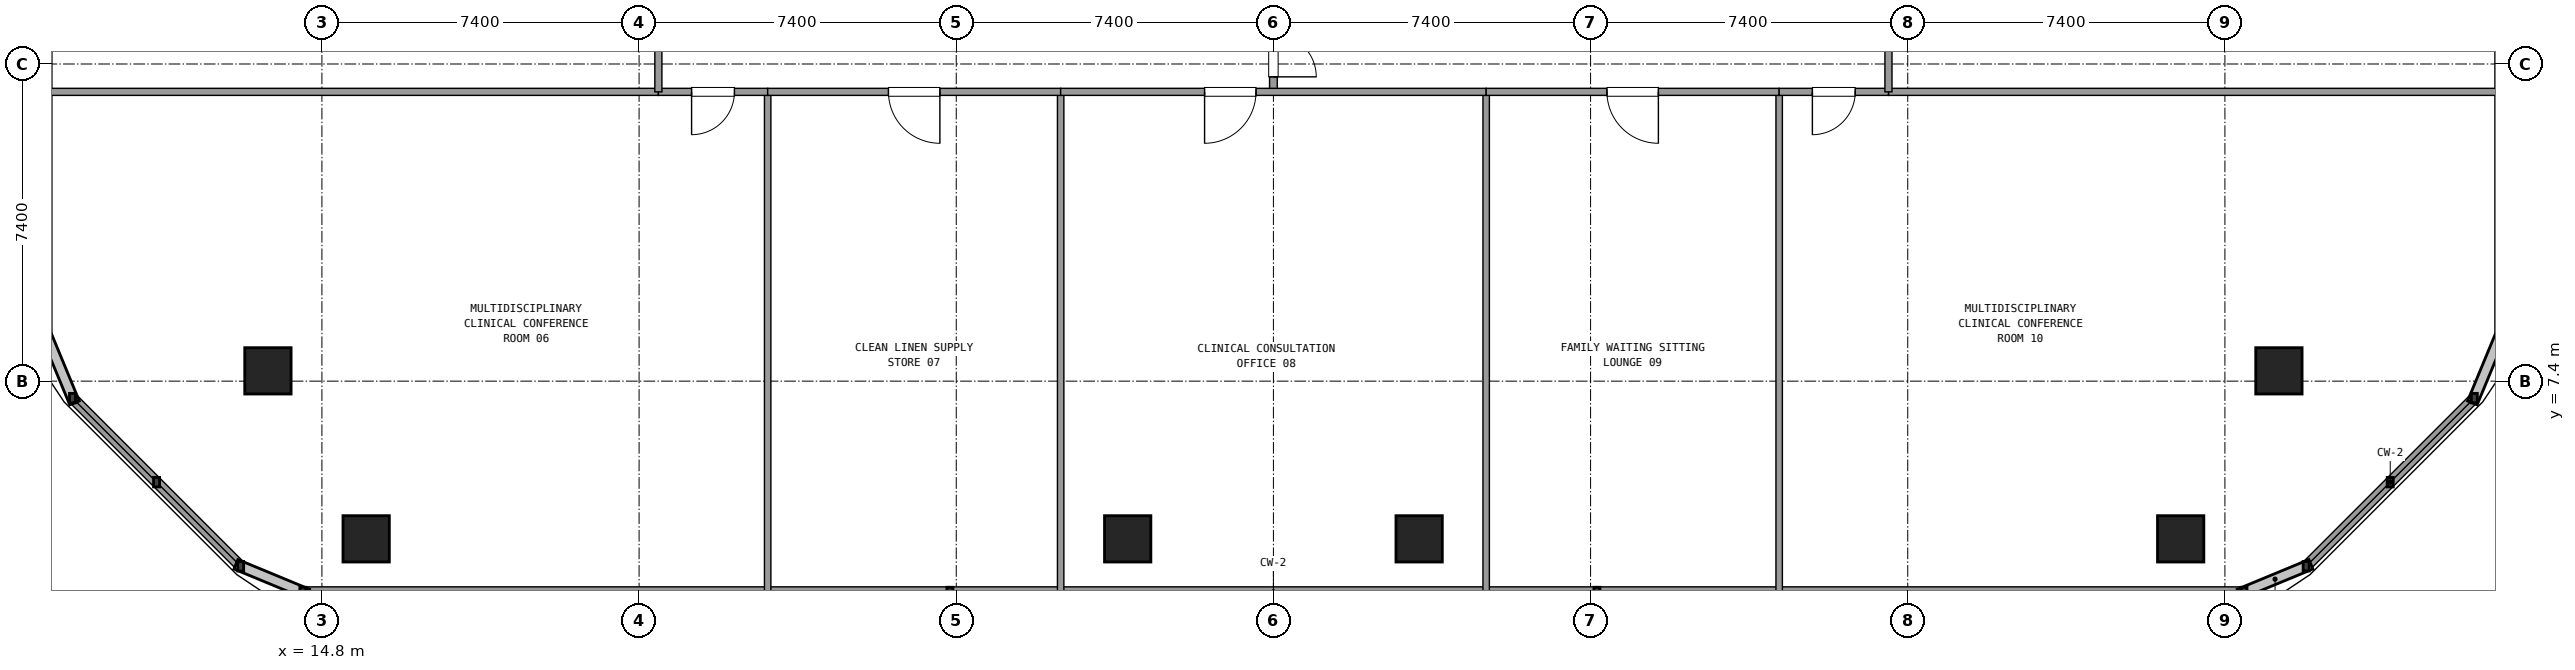
"""IFC4 building model, lengths in metres.
Left out: names, types, materials, properties, quantities, classifications, styles, units other than length and angle.
Written with IfcOpenShell. Run it as: python <this file> out.ifc"""

import sys

from ifc_helpers import new_model, si_unit, direction, frame, frame_2d, origin, origin_2d, place, context, subcontext, project, spatial, rectangle, extrude, element, fill, save


model = new_model("IFC4")
c1 = context("Model", 3, precision=1e-05, world=origin(), true_north=direction((0.0, 1.0)))
c2 = subcontext(c1, "Body", "Model", "MODEL_VIEW")
j1 = project(units=[si_unit("LENGTHUNIT", "METRE"), si_unit("PLANEANGLEUNIT", "RADIAN")], contexts=[c1])
p1 = place(None, origin())
s1 = spatial("IfcSite", under=j1, at=p1, CompositionType="ELEMENT")
p2 = place(p1, origin())
s2 = spatial("IfcBuilding", under=s1, at=p2, CompositionType="ELEMENT")
p3 = place(p2, frame((0.0, 0.0, 41.94)))
s3 = spatial("IfcBuildingStorey", under=s2, at=p3, CompositionType="ELEMENT", Elevation=41.94)
for number, where, z_axis, x_axis in (
    (1, (13.54, 7.64, 0.0), (0.0, 0.0, 1.0), (1.0, 0.0, 0.0)),
    (2, (15.832, 3.72, 0.0), (0.0, 0.0, 1.0), (1.0, 0.0, 0.0)),
    (3, (33.6, 3.72, 0.0), (0.0, 0.0, 1.0), (1.0, 0.0, 0.0)),
    (4, (40.4, 3.72, 0.0), (0.0, 0.0, 1.0), (1.0, 0.0, 0.0)),
    (5, (58.168, 3.72, 0.0), (0.0, 0.0, 1.0), (1.0, 0.0, 0.0)),
    (6, (60.46, 7.64, 0.0), (0.0, 0.0, 1.0), (1.0, 0.0, 0.0)),
):
    element("IfcColumn", number, at=place(p3, frame(where, z_axis=z_axis, x_axis=x_axis)), inside=s3, PredefinedType="COLUMN", context=c2, shape_type="SweptSolid", body=[
        extrude(rectangle(XDim=1.08, YDim=1.08, at=origin_2d()), origin(), (0.0, 0.0, 1.0), 3.6),
    ])
p4 = place(p3, frame((14.355, 2.48, 0.0), z_axis=(0.0, 0.0, 1.0), x_axis=(1.0, 0.0, 0.0)))
e7 = element("IfcWall", 7, at=p4, inside=s3, PredefinedType="SOLIDWALL", context=c2, shape_type="SweptSolid", body=[
    extrude(rectangle(XDim=45.29, YDim=0.24, at=frame_2d((22.645, 0.0))), origin(), (0.0, 0.0, 1.0), 0.85),
])
for number, where, z_axis, x_axis in (
    (8, (61.096, 3.081, 0.0), (0.0, 0.0, 1.0), (0.707, 0.707, 0.0)),
    (9, (8.981, 7.004, 0.0), (0.0, 0.0, 1.0), (0.707, -0.707, 0.0)),
):
    element("IfcWall", number, at=place(p3, frame(where, z_axis=z_axis, x_axis=x_axis)), inside=s3, PredefinedType="SOLIDWALL", context=c2, shape_type="SweptSolid", body=[
        extrude(rectangle(XDim=5.548, YDim=0.24, at=frame_2d((2.774, 0.0))), origin(), (0.0, 0.0, 1.0), 0.85),
    ])
p5 = place(p3, frame((37.0, 14.15, 0.0), z_axis=(0.0, 0.0, 1.0), x_axis=(0.0, 1.0, 0.0)))
e10 = element("IfcWall", 10, at=p5, inside=s3, PredefinedType="PARTITIONING", context=c2, shape_type="SweptSolid", body=[
    extrude(rectangle(XDim=2.7, YDim=0.18, at=frame_2d((1.35, 0.0))), origin(), (0.0, 0.0, 1.0), 2.61),
])
p6 = place(p5, frame((0.35, 0.0, 0.0)))
e11 = element("IfcOpeningElement", 11, at=p6, cuts=e10, PredefinedType="OPENING", context=c2, shape_type="SweptSolid", body=[
    extrude(rectangle(XDim=2.0, YDim=2.2, at=frame_2d((1.0, 1.1))), frame((0.0, 0.1, 0.0), z_axis=(0.0, -1.0, 0.0), x_axis=(1.0, 0.0, 0.0)), (0.0, 0.0, 1.0), 0.2),
])
for number, where, z_axis, x_axis in (
    (12, (8.4, 14.15, 0.0), (0.0, 0.0, 1.0), (1.0, 0.0, 0.0)),
    (13, (51.35, 14.15, 0.0), (0.0, 0.0, 1.0), (1.0, 0.0, 0.0)),
):
    element("IfcWall", number, at=place(p3, frame(where, z_axis=z_axis, x_axis=x_axis)), inside=s3, PredefinedType="PARTITIONING", context=c2, shape_type="SweptSolid", body=[
        extrude(rectangle(XDim=14.25, YDim=0.165, at=frame_2d((7.125, 0.0))), origin(), (0.0, 0.0, 1.0), 2.61),
    ])
p7 = place(p3, frame((25.2, 14.15, 0.0), z_axis=(0.0, 0.0, 1.0), x_axis=(0.0, -1.0, 0.0)))
e14 = element("IfcWall", 14, at=p7, inside=s3, PredefinedType="PARTITIONING", context=c2, shape_type="SweptSolid", body=[
    extrude(rectangle(XDim=11.65, YDim=0.15, at=frame_2d((5.825, 0.0))), origin(), (0.0, 0.0, 1.0), 2.61),
])
p8 = place(p3, frame((22.65, 14.15, 0.0), z_axis=(0.0, 0.0, 1.0), x_axis=(1.0, 0.0, 0.0)))
e15 = element("IfcWall", 15, at=p8, inside=s3, PredefinedType="PARTITIONING", context=c2, shape_type="SweptSolid", body=[
    extrude(rectangle(XDim=2.55, YDim=0.165, at=frame_2d((1.275, 0.0))), origin(), (0.0, 0.0, 1.0), 2.61),
])
p9 = place(p8, frame((0.775, 0.0, 0.0)))
e16 = element("IfcOpeningElement", 16, at=p9, cuts=e15, PredefinedType="OPENING", context=c2, shape_type="SweptSolid", body=[
    extrude(rectangle(XDim=1.0, YDim=2.15, at=frame_2d((0.5, 1.075))), frame((0.0, 0.093, 0.0), z_axis=(0.0, -1.0, 0.0), x_axis=(1.0, 0.0, 0.0)), (0.0, 0.0, 1.0), 0.185),
])
p10 = place(p3, frame((32.036, 14.15, 0.0), z_axis=(0.0, 0.0, 1.0), x_axis=(0.0, -1.0, 0.0)))
e17 = element("IfcWall", 17, at=p10, inside=s3, PredefinedType="PARTITIONING", context=c2, shape_type="SweptSolid", body=[
    extrude(rectangle(XDim=11.65, YDim=0.15, at=frame_2d((5.825, 0.0))), origin(), (0.0, 0.0, 1.0), 2.61),
])
p11 = place(p3, frame((25.2, 14.15, 0.0), z_axis=(0.0, 0.0, 1.0), x_axis=(1.0, 0.0, 0.0)))
e18 = element("IfcWall", 18, at=p11, inside=s3, PredefinedType="PARTITIONING", context=c2, shape_type="SweptSolid", body=[
    extrude(rectangle(XDim=6.836, YDim=0.165, at=frame_2d((3.418, 0.0))), origin(), (0.0, 0.0, 1.0), 2.61),
])
p12 = place(p11, frame((2.818, 0.0, 0.0)))
e19 = element("IfcOpeningElement", 19, at=p12, cuts=e18, PredefinedType="OPENING", context=c2, shape_type="SweptSolid", body=[
    extrude(rectangle(XDim=1.2, YDim=2.15, at=frame_2d((0.6, 1.075))), frame((0.0, 0.093, 0.0), z_axis=(0.0, -1.0, 0.0), x_axis=(1.0, 0.0, 0.0)), (0.0, 0.0, 1.0), 0.185),
])
p13 = place(p3, frame((41.964, 14.15, 0.0), z_axis=(0.0, 0.0, 1.0), x_axis=(0.0, -1.0, 0.0)))
e20 = element("IfcWall", 20, at=p13, inside=s3, PredefinedType="PARTITIONING", context=c2, shape_type="SweptSolid", body=[
    extrude(rectangle(XDim=11.65, YDim=0.15, at=frame_2d((5.825, 0.0))), origin(), (0.0, 0.0, 1.0), 2.61),
])
p14 = place(p3, frame((32.036, 14.15, 0.0), z_axis=(0.0, 0.0, 1.0), x_axis=(1.0, 0.0, 0.0)))
e21 = element("IfcWall", 21, at=p14, inside=s3, PredefinedType="PARTITIONING", context=c2, shape_type="SweptSolid", body=[
    extrude(rectangle(XDim=9.928, YDim=0.165, at=frame_2d((4.964, 0.0))), origin(), (0.0, 0.0, 1.0), 2.61),
])
p15 = place(p14, frame((3.358, 0.0, 0.0)))
e22 = element("IfcOpeningElement", 22, at=p15, cuts=e21, PredefinedType="OPENING", context=c2, shape_type="SweptSolid", body=[
    extrude(rectangle(XDim=1.2, YDim=2.15, at=frame_2d((0.6, 1.075))), frame((0.0, 0.093, 0.0), z_axis=(0.0, -1.0, 0.0), x_axis=(1.0, 0.0, 0.0)), (0.0, 0.0, 1.0), 0.185),
])
p16 = place(p3, frame((48.8, 14.15, 0.0), z_axis=(0.0, 0.0, 1.0), x_axis=(0.0, -1.0, 0.0)))
e23 = element("IfcWall", 23, at=p16, inside=s3, PredefinedType="PARTITIONING", context=c2, shape_type="SweptSolid", body=[
    extrude(rectangle(XDim=11.65, YDim=0.15, at=frame_2d((5.825, 0.0))), origin(), (0.0, 0.0, 1.0), 2.61),
])
p17 = place(p3, frame((41.964, 14.15, 0.0), z_axis=(0.0, 0.0, 1.0), x_axis=(1.0, 0.0, 0.0)))
e24 = element("IfcWall", 24, at=p17, inside=s3, PredefinedType="PARTITIONING", context=c2, shape_type="SweptSolid", body=[
    extrude(rectangle(XDim=6.836, YDim=0.165, at=frame_2d((3.418, 0.0))), origin(), (0.0, 0.0, 1.0), 2.61),
])
p18 = place(p17, frame((2.818, 0.0, 0.0)))
e25 = element("IfcOpeningElement", 25, at=p18, cuts=e24, PredefinedType="OPENING", context=c2, shape_type="SweptSolid", body=[
    extrude(rectangle(XDim=1.2, YDim=2.15, at=frame_2d((0.6, 1.075))), frame((0.0, 0.093, 0.0), z_axis=(0.0, -1.0, 0.0), x_axis=(1.0, 0.0, 0.0)), (0.0, 0.0, 1.0), 0.185),
])
p19 = place(p3, frame((48.8, 14.15, 0.0), z_axis=(0.0, 0.0, 1.0), x_axis=(1.0, 0.0, 0.0)))
e26 = element("IfcWall", 26, at=p19, inside=s3, PredefinedType="PARTITIONING", context=c2, shape_type="SweptSolid", body=[
    extrude(rectangle(XDim=2.55, YDim=0.165, at=frame_2d((1.275, 0.0))), origin(), (0.0, 0.0, 1.0), 2.61),
])
p20 = place(p19, frame((0.775, 0.0, 0.0)))
e27 = element("IfcOpeningElement", 27, at=p20, cuts=e26, PredefinedType="OPENING", context=c2, shape_type="SweptSolid", body=[
    extrude(rectangle(XDim=1.0, YDim=2.15, at=frame_2d((0.5, 1.075))), frame((0.0, 0.093, 0.0), z_axis=(0.0, -1.0, 0.0), x_axis=(1.0, 0.0, 0.0)), (0.0, 0.0, 1.0), 0.185),
])
p21 = place(p3, frame((22.65, 14.15, 0.0), z_axis=(0.0, 0.0, 1.0), x_axis=(0.0, 1.0, 0.0)))
e28 = element("IfcWall", 28, at=p21, inside=s3, PredefinedType="PARTITIONING", context=c2, shape_type="SweptSolid", body=[
    extrude(rectangle(XDim=5.377, YDim=0.165, at=frame_2d((2.688, 0.0))), origin(), (0.0, 0.0, 1.0), 2.61),
])
p22 = place(p21, frame((2.089, 0.0, 0.0)))
e29 = element("IfcOpeningElement", 29, at=p22, cuts=e28, PredefinedType="OPENING", context=c2, shape_type="SweptSolid", body=[
    extrude(rectangle(XDim=1.2, YDim=2.15, at=frame_2d((0.6, 1.075))), frame((0.0, 0.093, 0.0), z_axis=(0.0, -1.0, 0.0), x_axis=(1.0, 0.0, 0.0)), (0.0, 0.0, 1.0), 0.185),
])
p23 = place(p3, frame((51.35, 14.15, 0.0), z_axis=(0.0, 0.0, 1.0), x_axis=(0.0, 1.0, 0.0)))
e30 = element("IfcWall", 30, at=p23, inside=s3, PredefinedType="PARTITIONING", context=c2, shape_type="SweptSolid", body=[
    extrude(rectangle(XDim=5.875, YDim=0.165, at=frame_2d((2.938, 0.0))), origin(), (0.0, 0.0, 1.0), 2.61),
])
p24 = place(p23, frame((2.337, 0.0, 0.0)))
e31 = element("IfcOpeningElement", 31, at=p24, cuts=e30, PredefinedType="OPENING", context=c2, shape_type="SweptSolid", body=[
    extrude(rectangle(XDim=1.2, YDim=2.15, at=frame_2d((0.6, 1.075))), frame((0.0, 0.093, 0.0), z_axis=(0.0, -1.0, 0.0), x_axis=(1.0, 0.0, 0.0)), (0.0, 0.0, 1.0), 0.185),
])
p25 = place(p6, frame((2.0, 0.0, 0.0), z_axis=(0.0, 0.0, 1.0), x_axis=(-1.0, 0.0, 0.0)))
e32 = element("IfcDoor", 32, at=p25, inside=s3, OperationType="DOUBLE_DOOR_SINGLE_SWING", PredefinedType="DOOR", context=c2, shape_type="SweptSolid", body=[
    extrude(rectangle(XDim=2.0, YDim=2.2, at=frame_2d((1.0, 1.1))), frame((0.0, 0.025, 0.0), z_axis=(0.0, -1.0, 0.0), x_axis=(1.0, 0.0, 0.0)), (0.0, 0.0, 1.0), 0.05),
])
fill(e11, e32)
p26 = place(p9, frame((1.0, 0.0, 0.0), z_axis=(0.0, 0.0, 1.0), x_axis=(-1.0, 0.0, 0.0)))
e33 = element("IfcDoor", 33, at=p26, inside=s3, OperationType="SINGLE_SWING_LEFT", PredefinedType="DOOR", context=c2, shape_type="SweptSolid", body=[
    extrude(rectangle(XDim=1.0, YDim=2.15, at=frame_2d((0.5, 1.075))), frame((0.0, 0.025, 0.0), z_axis=(0.0, -1.0, 0.0), x_axis=(1.0, 0.0, 0.0)), (0.0, 0.0, 1.0), 0.05),
])
fill(e16, e33)
p27 = place(p12, frame((1.2, 0.0, 0.0), z_axis=(0.0, 0.0, 1.0), x_axis=(-1.0, 0.0, 0.0)))
e34 = element("IfcDoor", 34, at=p27, inside=s3, OperationType="SINGLE_SWING_RIGHT", PredefinedType="DOOR", context=c2, shape_type="SweptSolid", body=[
    extrude(rectangle(XDim=1.2, YDim=2.15, at=frame_2d((0.6, 1.075))), frame((0.0, 0.025, 0.0), z_axis=(0.0, -1.0, 0.0), x_axis=(1.0, 0.0, 0.0)), (0.0, 0.0, 1.0), 0.05),
])
fill(e19, e34)
p28 = place(p15, frame((1.2, 0.0, 0.0), z_axis=(0.0, 0.0, 1.0), x_axis=(-1.0, 0.0, 0.0)))
e35 = element("IfcDoor", 35, at=p28, inside=s3, OperationType="SINGLE_SWING_LEFT", PredefinedType="DOOR", context=c2, shape_type="SweptSolid", body=[
    extrude(rectangle(XDim=1.2, YDim=2.15, at=frame_2d((0.6, 1.075))), frame((0.0, 0.025, 0.0), z_axis=(0.0, -1.0, 0.0), x_axis=(1.0, 0.0, 0.0)), (0.0, 0.0, 1.0), 0.05),
])
fill(e22, e35)
p29 = place(p18, frame((1.2, 0.0, 0.0), z_axis=(0.0, 0.0, 1.0), x_axis=(-1.0, 0.0, 0.0)))
e36 = element("IfcDoor", 36, at=p29, inside=s3, OperationType="SINGLE_SWING_RIGHT", PredefinedType="DOOR", context=c2, shape_type="SweptSolid", body=[
    extrude(rectangle(XDim=1.2, YDim=2.15, at=frame_2d((0.6, 1.075))), frame((0.0, 0.025, 0.0), z_axis=(0.0, -1.0, 0.0), x_axis=(1.0, 0.0, 0.0)), (0.0, 0.0, 1.0), 0.05),
])
fill(e25, e36)
p30 = place(p20, frame((1.0, 0.0, 0.0), z_axis=(0.0, 0.0, 1.0), x_axis=(-1.0, 0.0, 0.0)))
e37 = element("IfcDoor", 37, at=p30, inside=s3, OperationType="SINGLE_SWING_LEFT", PredefinedType="DOOR", context=c2, shape_type="SweptSolid", body=[
    extrude(rectangle(XDim=1.0, YDim=2.15, at=frame_2d((0.5, 1.075))), frame((0.0, 0.025, 0.0), z_axis=(0.0, -1.0, 0.0), x_axis=(1.0, 0.0, 0.0)), (0.0, 0.0, 1.0), 0.05),
])
fill(e27, e37)
save(model, sys.argv[1])
